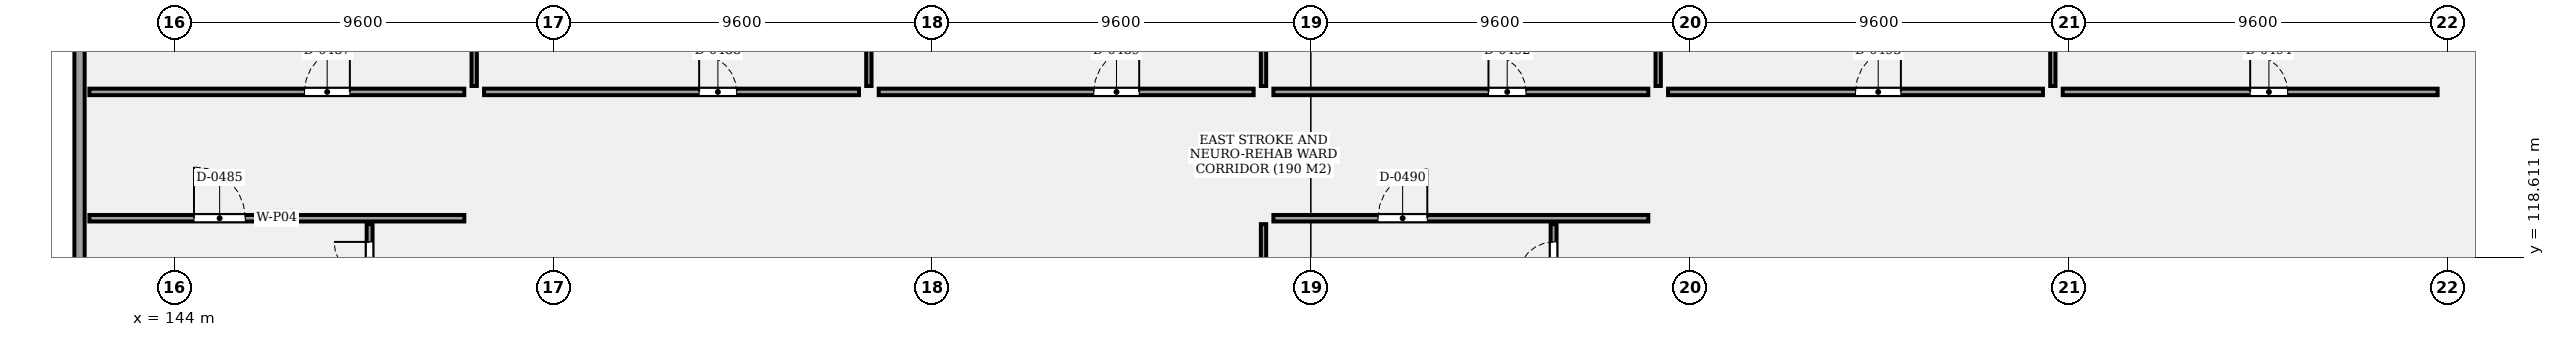
"""IFC4 building model, lengths in metres.
Left out: names, types, materials, properties, quantities, classifications, styles, units other than length and angle.
Written with IfcOpenShell. Run it as: python <this file> out.ifc"""

import sys

from ifc_helpers import new_model, si_unit, direction, frame, frame_2d, origin, place, context, subcontext, project, spatial, rectangle, extrude, element, fill, save


model = new_model("IFC4")
c1 = context("Model", 3, precision=1e-05, world=origin(), true_north=direction((0.0, 1.0)))
c2 = subcontext(c1, "Body", "Model", "MODEL_VIEW")
j1 = project(units=[si_unit("LENGTHUNIT", "METRE"), si_unit("PLANEANGLEUNIT", "RADIAN")], contexts=[c1])
p1 = place(None, origin())
s1 = spatial("IfcSite", under=j1, at=p1, CompositionType="ELEMENT")
p2 = place(p1, origin())
s2 = spatial("IfcBuilding", under=s1, at=p2, CompositionType="ELEMENT")
p3 = place(p2, frame((0.0, 0.0, 26.2)))
s3 = spatial("IfcBuildingStorey", under=s2, at=p3, CompositionType="ELEMENT", Elevation=26.2)
p4 = place(p3, frame((141.6, 105.16, 0.0), z_axis=(0.0, 0.0, 1.0), x_axis=(0.0, 1.0, 0.0)))
e1 = element("IfcWall", 1, at=p4, inside=s3, PredefinedType="SOLIDWALL", context=c2, shape_type="SweptSolid", body=[
    extrude(rectangle(XDim=29.08, YDim=0.26, at=frame_2d((14.54, 0.0))), origin(), (0.0, 0.0, 1.0), 3.39),
])
p5 = place(p4, frame((7.184, 0.0, 0.85)))
e2 = element("IfcOpeningElement", 2, at=p5, cuts=e1, PredefinedType="OPENING", context=c2, shape_type="SweptSolid", body=[
    extrude(rectangle(XDim=1.45, YDim=1.6, at=frame_2d((0.725, 0.8))), frame((0.0, 0.14, 0.0), z_axis=(0.0, -1.0, 0.0), x_axis=(1.0, 0.0, 0.0)), (0.0, 0.0, 1.0), 0.28),
])
p6 = place(p4, frame((20.446, 0.0, 0.85)))
e3 = element("IfcOpeningElement", 3, at=p6, cuts=e1, PredefinedType="OPENING", context=c2, shape_type="SweptSolid", body=[
    extrude(rectangle(XDim=1.45, YDim=1.6, at=frame_2d((0.725, 0.8))), frame((0.0, 0.14, 0.0), z_axis=(0.0, -1.0, 0.0), x_axis=(1.0, 0.0, 0.0)), (0.0, 0.0, 1.0), 0.28),
])
p7 = place(p3, frame((141.85, 119.6, 0.0), z_axis=(0.0, 0.0, 1.0), x_axis=(1.0, 0.0, 0.0)))
e4 = element("IfcWall", 4, at=p7, inside=s3, PredefinedType="PARTITIONING", context=c2, shape_type="SweptSolid", body=[
    extrude(rectangle(XDim=9.5, YDim=0.165, at=frame_2d((4.75, 0.0))), origin(), (0.0, 0.0, 1.0), 3.3),
])
p8 = place(p7, frame((2.65, 0.0, 0.0)))
e5 = element("IfcOpeningElement", 5, at=p8, cuts=e4, PredefinedType="OPENING", context=c2, shape_type="SweptSolid", body=[
    extrude(rectangle(XDim=1.3, YDim=2.2, at=frame_2d((0.65, 1.1))), frame((0.0, 0.093, 0.0), z_axis=(0.0, -1.0, 0.0), x_axis=(1.0, 0.0, 0.0)), (0.0, 0.0, 1.0), 0.185),
])
p9 = place(p3, frame((148.95, 117.15, 0.0), z_axis=(0.0, 0.0, 1.0), x_axis=(0.0, 1.0, 0.0)))
e6 = element("IfcWall", 6, at=p9, inside=s3, PredefinedType="PARTITIONING", context=c2, shape_type="SweptSolid", body=[
    extrude(rectangle(XDim=2.3, YDim=0.15, at=frame_2d((1.15, 0.0))), origin(), (0.0, 0.0, 1.0), 3.3),
])
p10 = place(p9, frame((0.95, 0.0, 0.0)))
e7 = element("IfcOpeningElement", 7, at=p10, cuts=e6, PredefinedType="OPENING", context=c2, shape_type="SweptSolid", body=[
    extrude(rectangle(XDim=0.9, YDim=2.1, at=frame_2d((0.45, 1.05))), frame((0.0, 0.085, 0.0), z_axis=(0.0, -1.0, 0.0), x_axis=(1.0, 0.0, 0.0)), (0.0, 0.0, 1.0), 0.17),
])
p11 = place(p3, frame((141.85, 122.8, 0.0), z_axis=(0.0, 0.0, 1.0), x_axis=(1.0, 0.0, 0.0)))
e8 = element("IfcWall", 8, at=p11, inside=s3, PredefinedType="PARTITIONING", context=c2, shape_type="SweptSolid", body=[
    extrude(rectangle(XDim=9.5, YDim=0.165, at=frame_2d((4.75, 0.0))), origin(), (0.0, 0.0, 1.0), 3.3),
])
p12 = place(p11, frame((5.45, 0.0, 0.0)))
e9 = element("IfcOpeningElement", 9, at=p12, cuts=e8, PredefinedType="OPENING", context=c2, shape_type="SweptSolid", body=[
    extrude(rectangle(XDim=1.15, YDim=2.2, at=frame_2d((0.575, 1.1))), frame((0.0, 0.093, 0.0), z_axis=(0.0, -1.0, 0.0), x_axis=(1.0, 0.0, 0.0)), (0.0, 0.0, 1.0), 0.185),
])
p13 = place(p3, frame((151.85, 122.8, 0.0), z_axis=(0.0, 0.0, 1.0), x_axis=(1.0, 0.0, 0.0)))
e10 = element("IfcWall", 10, at=p13, inside=s3, PredefinedType="PARTITIONING", context=c2, shape_type="SweptSolid", body=[
    extrude(rectangle(XDim=9.5, YDim=0.165, at=frame_2d((4.75, 0.0))), origin(), (0.0, 0.0, 1.0), 3.3),
])
p14 = place(p13, frame((5.45, 0.0, 0.0)))
e11 = element("IfcOpeningElement", 11, at=p14, cuts=e10, PredefinedType="OPENING", context=c2, shape_type="SweptSolid", body=[
    extrude(rectangle(XDim=0.95, YDim=2.1, at=frame_2d((0.475, 1.05))), frame((0.0, 0.093, 0.0), z_axis=(0.0, -1.0, 0.0), x_axis=(1.0, 0.0, 0.0)), (0.0, 0.0, 1.0), 0.185),
])
p15 = place(p3, frame((151.6, 122.95, 0.0), z_axis=(0.0, 0.0, 1.0), x_axis=(0.0, 1.0, 0.0)))
e12 = element("IfcWall", 12, at=p15, inside=s3, PredefinedType="PARTITIONING", context=c2, shape_type="SweptSolid", body=[
    extrude(rectangle(XDim=10.9, YDim=0.135, at=frame_2d((5.45, 0.0))), origin(), (0.0, 0.0, 1.0), 3.3),
])
p16 = place(p3, frame((161.85, 122.8, 0.0), z_axis=(0.0, 0.0, 1.0), x_axis=(1.0, 0.0, 0.0)))
e13 = element("IfcWall", 13, at=p16, inside=s3, PredefinedType="PARTITIONING", context=c2, shape_type="SweptSolid", body=[
    extrude(rectangle(XDim=9.5, YDim=0.165, at=frame_2d((4.75, 0.0))), origin(), (0.0, 0.0, 1.0), 3.3),
])
p17 = place(p16, frame((5.45, 0.0, 0.0)))
e14 = element("IfcOpeningElement", 14, at=p17, cuts=e13, PredefinedType="OPENING", context=c2, shape_type="SweptSolid", body=[
    extrude(rectangle(XDim=1.15, YDim=2.2, at=frame_2d((0.575, 1.1))), frame((0.0, 0.093, 0.0), z_axis=(0.0, -1.0, 0.0), x_axis=(1.0, 0.0, 0.0)), (0.0, 0.0, 1.0), 0.185),
])
p18 = place(p3, frame((161.6, 122.95, 0.0), z_axis=(0.0, 0.0, 1.0), x_axis=(0.0, 1.0, 0.0)))
e15 = element("IfcWall", 15, at=p18, inside=s3, PredefinedType="PARTITIONING", context=c2, shape_type="SweptSolid", body=[
    extrude(rectangle(XDim=10.9, YDim=0.135, at=frame_2d((5.45, 0.0))), origin(), (0.0, 0.0, 1.0), 3.3),
])
p19 = place(p3, frame((171.85, 119.6, 0.0), z_axis=(0.0, 0.0, 1.0), x_axis=(1.0, 0.0, 0.0)))
e16 = element("IfcWall", 16, at=p19, inside=s3, PredefinedType="PARTITIONING", context=c2, shape_type="SweptSolid", body=[
    extrude(rectangle(XDim=9.5, YDim=0.165, at=frame_2d((4.75, 0.0))), origin(), (0.0, 0.0, 1.0), 3.3),
])
p20 = place(p19, frame((2.65, 0.0, 0.0)))
e17 = element("IfcOpeningElement", 17, at=p20, cuts=e16, PredefinedType="OPENING", context=c2, shape_type="SweptSolid", body=[
    extrude(rectangle(XDim=1.25, YDim=2.2, at=frame_2d((0.625, 1.1))), frame((0.0, 0.093, 0.0), z_axis=(0.0, -1.0, 0.0), x_axis=(1.0, 0.0, 0.0)), (0.0, 0.0, 1.0), 0.185),
])
p21 = place(p3, frame((178.95, 117.15, 0.0), z_axis=(0.0, 0.0, 1.0), x_axis=(0.0, 1.0, 0.0)))
e18 = element("IfcWall", 18, at=p21, inside=s3, PredefinedType="PARTITIONING", context=c2, shape_type="SweptSolid", body=[
    extrude(rectangle(XDim=2.3, YDim=0.15, at=frame_2d((1.15, 0.0))), origin(), (0.0, 0.0, 1.0), 3.3),
])
p22 = place(p21, frame((0.95, 0.0, 0.0)))
e19 = element("IfcOpeningElement", 19, at=p22, cuts=e18, PredefinedType="OPENING", context=c2, shape_type="SweptSolid", body=[
    extrude(rectangle(XDim=0.9, YDim=2.1, at=frame_2d((0.45, 1.05))), frame((0.0, 0.085, 0.0), z_axis=(0.0, -1.0, 0.0), x_axis=(1.0, 0.0, 0.0)), (0.0, 0.0, 1.0), 0.17),
])
p23 = place(p3, frame((171.6, 101.35, 0.0), z_axis=(0.0, 0.0, 1.0), x_axis=(0.0, 1.0, 0.0)))
e20 = element("IfcWall", 20, at=p23, inside=s3, PredefinedType="PARTITIONING", context=c2, shape_type="SweptSolid", body=[
    extrude(rectangle(XDim=18.1, YDim=0.135, at=frame_2d((9.05, 0.0))), origin(), (0.0, 0.0, 1.0), 3.3),
])
p24 = place(p3, frame((171.85, 122.8, 0.0), z_axis=(0.0, 0.0, 1.0), x_axis=(1.0, 0.0, 0.0)))
e21 = element("IfcWall", 21, at=p24, inside=s3, PredefinedType="PARTITIONING", context=c2, shape_type="SweptSolid", body=[
    extrude(rectangle(XDim=9.5, YDim=0.165, at=frame_2d((4.75, 0.0))), origin(), (0.0, 0.0, 1.0), 3.3),
])
p25 = place(p24, frame((5.45, 0.0, 0.0)))
e22 = element("IfcOpeningElement", 22, at=p25, cuts=e21, PredefinedType="OPENING", context=c2, shape_type="SweptSolid", body=[
    extrude(rectangle(XDim=0.95, YDim=2.1, at=frame_2d((0.475, 1.05))), frame((0.0, 0.093, 0.0), z_axis=(0.0, -1.0, 0.0), x_axis=(1.0, 0.0, 0.0)), (0.0, 0.0, 1.0), 0.185),
])
p26 = place(p3, frame((171.6, 122.95, 0.0), z_axis=(0.0, 0.0, 1.0), x_axis=(0.0, 1.0, 0.0)))
e23 = element("IfcWall", 23, at=p26, inside=s3, PredefinedType="PARTITIONING", context=c2, shape_type="SweptSolid", body=[
    extrude(rectangle(XDim=10.9, YDim=0.135, at=frame_2d((5.45, 0.0))), origin(), (0.0, 0.0, 1.0), 3.3),
])
p27 = place(p3, frame((181.85, 122.8, 0.0), z_axis=(0.0, 0.0, 1.0), x_axis=(1.0, 0.0, 0.0)))
e24 = element("IfcWall", 24, at=p27, inside=s3, PredefinedType="PARTITIONING", context=c2, shape_type="SweptSolid", body=[
    extrude(rectangle(XDim=9.5, YDim=0.165, at=frame_2d((4.75, 0.0))), origin(), (0.0, 0.0, 1.0), 3.3),
])
p28 = place(p27, frame((4.75, 0.0, 0.0)))
e25 = element("IfcOpeningElement", 25, at=p28, cuts=e24, PredefinedType="OPENING", context=c2, shape_type="SweptSolid", body=[
    extrude(rectangle(XDim=1.15, YDim=2.2, at=frame_2d((0.575, 1.1))), frame((0.0, 0.093, 0.0), z_axis=(0.0, -1.0, 0.0), x_axis=(1.0, 0.0, 0.0)), (0.0, 0.0, 1.0), 0.185),
])
p29 = place(p3, frame((181.6, 122.95, 0.0), z_axis=(0.0, 0.0, 1.0), x_axis=(0.0, 1.0, 0.0)))
e26 = element("IfcWall", 26, at=p29, inside=s3, PredefinedType="PARTITIONING", context=c2, shape_type="SweptSolid", body=[
    extrude(rectangle(XDim=10.9, YDim=0.135, at=frame_2d((5.45, 0.0))), origin(), (0.0, 0.0, 1.0), 3.3),
])
p30 = place(p3, frame((191.85, 122.8, 0.0), z_axis=(0.0, 0.0, 1.0), x_axis=(1.0, 0.0, 0.0)))
e27 = element("IfcWall", 27, at=p30, inside=s3, PredefinedType="PARTITIONING", context=c2, shape_type="SweptSolid", body=[
    extrude(rectangle(XDim=9.5, YDim=0.165, at=frame_2d((4.75, 0.0))), origin(), (0.0, 0.0, 1.0), 3.3),
])
p31 = place(p30, frame((4.75, 0.0, 0.0)))
e28 = element("IfcOpeningElement", 28, at=p31, cuts=e27, PredefinedType="OPENING", context=c2, shape_type="SweptSolid", body=[
    extrude(rectangle(XDim=0.95, YDim=2.1, at=frame_2d((0.475, 1.05))), frame((0.0, 0.093, 0.0), z_axis=(0.0, -1.0, 0.0), x_axis=(1.0, 0.0, 0.0)), (0.0, 0.0, 1.0), 0.185),
])
p32 = place(p3, frame((191.6, 122.95, 0.0), z_axis=(0.0, 0.0, 1.0), x_axis=(0.0, 1.0, 0.0)))
e29 = element("IfcWall", 29, at=p32, inside=s3, PredefinedType="PARTITIONING", context=c2, shape_type="SweptSolid", body=[
    extrude(rectangle(XDim=10.9, YDim=0.135, at=frame_2d((5.45, 0.0))), origin(), (0.0, 0.0, 1.0), 3.3),
])
p33 = place(p8, origin())
e30 = element("IfcDoor", 30, at=p33, inside=s3, OperationType="SINGLE_SWING_LEFT", PredefinedType="DOOR", context=c2, shape_type="SweptSolid", body=[
    extrude(rectangle(XDim=1.3, YDim=2.2, at=frame_2d((0.65, 1.1))), frame((0.0, 0.025, 0.0), z_axis=(0.0, -1.0, 0.0), x_axis=(1.0, 0.0, 0.0)), (0.0, 0.0, 1.0), 0.05),
])
fill(e5, e30)
p34 = place(p10, origin())
e31 = element("IfcDoor", 31, at=p34, inside=s3, OperationType="SINGLE_SWING_RIGHT", PredefinedType="DOOR", context=c2, shape_type="SweptSolid", body=[
    extrude(rectangle(XDim=0.9, YDim=2.1, at=frame_2d((0.45, 1.05))), frame((0.0, 0.025, 0.0), z_axis=(0.0, -1.0, 0.0), x_axis=(1.0, 0.0, 0.0)), (0.0, 0.0, 1.0), 0.05),
])
fill(e7, e31)
p35 = place(p12, origin())
e32 = element("IfcDoor", 32, at=p35, inside=s3, OperationType="SINGLE_SWING_RIGHT", PredefinedType="DOOR", context=c2, shape_type="SweptSolid", body=[
    extrude(rectangle(XDim=1.15, YDim=2.2, at=frame_2d((0.575, 1.1))), frame((0.0, 0.025, 0.0), z_axis=(0.0, -1.0, 0.0), x_axis=(1.0, 0.0, 0.0)), (0.0, 0.0, 1.0), 0.05),
])
fill(e9, e32)
p36 = place(p14, origin())
e33 = element("IfcDoor", 33, at=p36, inside=s3, OperationType="SINGLE_SWING_LEFT", PredefinedType="DOOR", context=c2, shape_type="SweptSolid", body=[
    extrude(rectangle(XDim=0.95, YDim=2.1, at=frame_2d((0.475, 1.05))), frame((0.0, 0.025, 0.0), z_axis=(0.0, -1.0, 0.0), x_axis=(1.0, 0.0, 0.0)), (0.0, 0.0, 1.0), 0.05),
])
fill(e11, e33)
p37 = place(p17, origin())
e34 = element("IfcDoor", 34, at=p37, inside=s3, OperationType="SINGLE_SWING_RIGHT", PredefinedType="DOOR", context=c2, shape_type="SweptSolid", body=[
    extrude(rectangle(XDim=1.15, YDim=2.2, at=frame_2d((0.575, 1.1))), frame((0.0, 0.025, 0.0), z_axis=(0.0, -1.0, 0.0), x_axis=(1.0, 0.0, 0.0)), (0.0, 0.0, 1.0), 0.05),
])
fill(e14, e34)
p38 = place(p20, origin())
e35 = element("IfcDoor", 35, at=p38, inside=s3, OperationType="SINGLE_SWING_RIGHT", PredefinedType="DOOR", context=c2, shape_type="SweptSolid", body=[
    extrude(rectangle(XDim=1.25, YDim=2.2, at=frame_2d((0.625, 1.1))), frame((0.0, 0.025, 0.0), z_axis=(0.0, -1.0, 0.0), x_axis=(1.0, 0.0, 0.0)), (0.0, 0.0, 1.0), 0.05),
])
fill(e17, e35)
p39 = place(p22, origin())
e36 = element("IfcDoor", 36, at=p39, inside=s3, OperationType="SINGLE_SWING_LEFT", PredefinedType="DOOR", context=c2, shape_type="SweptSolid", body=[
    extrude(rectangle(XDim=0.9, YDim=2.1, at=frame_2d((0.45, 1.05))), frame((0.0, 0.025, 0.0), z_axis=(0.0, -1.0, 0.0), x_axis=(1.0, 0.0, 0.0)), (0.0, 0.0, 1.0), 0.05),
])
fill(e19, e36)
p40 = place(p25, origin())
e37 = element("IfcDoor", 37, at=p40, inside=s3, OperationType="SINGLE_SWING_LEFT", PredefinedType="DOOR", context=c2, shape_type="SweptSolid", body=[
    extrude(rectangle(XDim=0.95, YDim=2.1, at=frame_2d((0.475, 1.05))), frame((0.0, 0.025, 0.0), z_axis=(0.0, -1.0, 0.0), x_axis=(1.0, 0.0, 0.0)), (0.0, 0.0, 1.0), 0.05),
])
fill(e22, e37)
p41 = place(p28, origin())
e38 = element("IfcDoor", 38, at=p41, inside=s3, OperationType="SINGLE_SWING_RIGHT", PredefinedType="DOOR", context=c2, shape_type="SweptSolid", body=[
    extrude(rectangle(XDim=1.15, YDim=2.2, at=frame_2d((0.575, 1.1))), frame((0.0, 0.025, 0.0), z_axis=(0.0, -1.0, 0.0), x_axis=(1.0, 0.0, 0.0)), (0.0, 0.0, 1.0), 0.05),
])
fill(e25, e38)
p42 = place(p31, origin())
e39 = element("IfcDoor", 39, at=p42, inside=s3, OperationType="SINGLE_SWING_LEFT", PredefinedType="DOOR", context=c2, shape_type="SweptSolid", body=[
    extrude(rectangle(XDim=0.95, YDim=2.1, at=frame_2d((0.475, 1.05))), frame((0.0, 0.025, 0.0), z_axis=(0.0, -1.0, 0.0), x_axis=(1.0, 0.0, 0.0)), (0.0, 0.0, 1.0), 0.05),
])
fill(e28, e39)
save(model, sys.argv[1])
